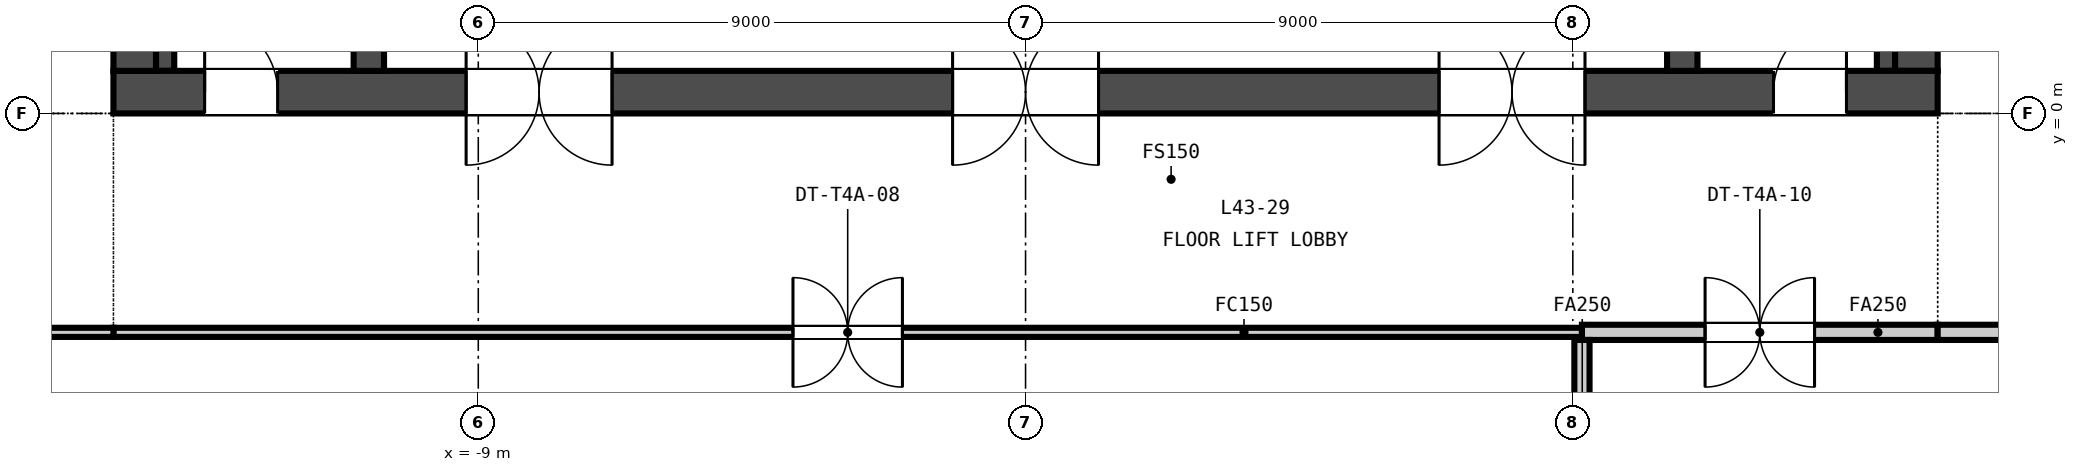
"""IFC4 building model, lengths in metres.
Left out: names, types, materials, properties, quantities, classifications, styles, units other than length and angle.
Written with IfcOpenShell. Run it as: python <this file> out.ifc"""

import sys

from ifc_helpers import new_model, si_unit, direction, frame, frame_2d, origin, place, context, subcontext, project, spatial, rectangle, extrude, element, fill, save


model = new_model("IFC4")
c1 = context("Model", 3, precision=1e-05, world=origin(), true_north=direction((0.0, 1.0)))
c2 = subcontext(c1, "Body", "Model", "MODEL_VIEW")
j1 = project(units=[si_unit("LENGTHUNIT", "METRE"), si_unit("PLANEANGLEUNIT", "RADIAN")], contexts=[c1])
p1 = place(None, origin())
s1 = spatial("IfcSite", under=j1, at=p1, CompositionType="ELEMENT")
p2 = place(p1, origin())
s2 = spatial("IfcBuilding", under=s1, at=p2, CompositionType="ELEMENT")
p3 = place(p2, frame((0.0, 0.0, 174.45)))
s3 = spatial("IfcBuildingStorey", under=s2, at=p3, CompositionType="ELEMENT", Elevation=174.45)
p4 = place(p3, frame((-15.0, 0.35, -0.15), z_axis=(0.0, 0.0, 1.0), x_axis=(1.0, 0.0, 0.0)))
e1 = element("IfcWall", 1, at=p4, inside=s3, PredefinedType="SOLIDWALL", context=c2, shape_type="SweptSolid", body=[
    extrude(rectangle(XDim=30.0, YDim=0.7, at=frame_2d((15.0, 0.0))), origin(), (0.0, 0.0, 1.0), 3.65),
])
p5 = place(p4, frame((5.8, 0.0, 0.15)))
e2 = element("IfcOpeningElement", 2, at=p5, cuts=e1, PredefinedType="OPENING", context=c2, shape_type="SweptSolid", body=[
    extrude(rectangle(XDim=2.4, YDim=2.4, at=frame_2d((1.2, 1.2))), frame((0.0, 0.36, 0.0), z_axis=(0.0, -1.0, 0.0), x_axis=(1.0, 0.0, 0.0)), (0.0, 0.0, 1.0), 0.72),
])
p6 = place(p4, frame((13.8, 0.0, 0.15)))
e3 = element("IfcOpeningElement", 3, at=p6, cuts=e1, PredefinedType="OPENING", context=c2, shape_type="SweptSolid", body=[
    extrude(rectangle(XDim=2.4, YDim=2.4, at=frame_2d((1.2, 1.2))), frame((0.0, 0.36, 0.0), z_axis=(0.0, -1.0, 0.0), x_axis=(1.0, 0.0, 0.0)), (0.0, 0.0, 1.0), 0.72),
])
p7 = place(p4, frame((21.8, 0.0, 0.15)))
e4 = element("IfcOpeningElement", 4, at=p7, cuts=e1, PredefinedType="OPENING", context=c2, shape_type="SweptSolid", body=[
    extrude(rectangle(XDim=2.4, YDim=2.4, at=frame_2d((1.2, 1.2))), frame((0.0, 0.36, 0.0), z_axis=(0.0, -1.0, 0.0), x_axis=(1.0, 0.0, 0.0)), (0.0, 0.0, 1.0), 0.72),
])
p8 = place(p4, frame((1.5, 0.0, 0.15)))
e5 = element("IfcOpeningElement", 5, at=p8, cuts=e1, PredefinedType="OPENING", context=c2, shape_type="SweptSolid", body=[
    extrude(rectangle(XDim=1.2, YDim=2.1, at=frame_2d((0.6, 1.05))), frame((0.0, 0.36, 0.0), z_axis=(0.0, -1.0, 0.0), x_axis=(1.0, 0.0, 0.0)), (0.0, 0.0, 1.0), 0.72),
])
p9 = place(p4, frame((27.3, 0.0, 0.15)))
e6 = element("IfcOpeningElement", 6, at=p9, cuts=e1, PredefinedType="OPENING", context=c2, shape_type="SweptSolid", body=[
    extrude(rectangle(XDim=1.2, YDim=2.1, at=frame_2d((0.6, 1.05))), frame((0.0, 0.36, 0.0), z_axis=(0.0, -1.0, 0.0), x_axis=(1.0, 0.0, 0.0)), (0.0, 0.0, 1.0), 0.72),
])
for number, where, z_axis, x_axis in (
    (7, (-14.65, 0.7, -0.15), (0.0, 0.0, 1.0), (0.0, 1.0, 0.0)),
    (8, (14.65, 0.7, -0.15), (0.0, 0.0, 1.0), (0.0, 1.0, 0.0)),
):
    element("IfcWall", number, at=place(p3, frame(where, z_axis=z_axis, x_axis=x_axis)), inside=s3, PredefinedType="SOLIDWALL", context=c2, shape_type="SweptSolid", body=[
        extrude(rectangle(XDim=13.6, YDim=0.7, at=frame_2d((6.8, 0.0))), origin(), (0.0, 0.0, 1.0), 3.65),
    ])
for number, where, z_axis, x_axis in (
    (9, (-10.8, 0.7, -0.15), (0.0, 0.0, 1.0), (0.0, 1.0, 0.0)),
    (10, (10.8, 0.7, -0.15), (0.0, 0.0, 1.0), (0.0, 1.0, 0.0)),
):
    element("IfcWall", number, at=place(p3, frame(where, z_axis=z_axis, x_axis=x_axis)), inside=s3, PredefinedType="SOLIDWALL", context=c2, shape_type="SweptSolid", body=[
        extrude(rectangle(XDim=13.6, YDim=0.5, at=frame_2d((6.8, 0.0))), origin(), (0.0, 0.0, 1.0), 3.65),
    ])
for number, where, z_axis, x_axis in (
    (11, (-14.15, 0.7, 0.0), (0.0, 0.0, 1.0), (0.0, 1.0, 0.0)),
    (12, (14.15, 0.7, 0.0), (0.0, 0.0, 1.0), (0.0, 1.0, 0.0)),
):
    element("IfcWall", number, at=place(p3, frame(where, z_axis=z_axis, x_axis=x_axis)), inside=s3, PredefinedType="SOLIDWALL", context=c2, shape_type="SweptSolid", body=[
        extrude(rectangle(XDim=13.6, YDim=0.3, at=frame_2d((6.8, 0.0))), origin(), (0.0, 0.0, 1.0), 3.5),
    ])
p10 = place(p3, frame((9.15, -3.6, 0.0), z_axis=(0.0, 0.0, 1.0), x_axis=(-1.0, 0.0, 0.0)))
e13 = element("IfcWall", 13, at=p10, inside=s3, PredefinedType="PARTITIONING", context=c2, shape_type="SweptSolid", body=[
    extrude(rectangle(XDim=24.15, YDim=0.15, at=frame_2d((12.075, 0.0))), origin(), (0.0, 0.0, 1.0), 2.741),
])
p11 = place(p10, frame((11.175, 0.0, 0.0)))
e14 = element("IfcOpeningElement", 14, at=p11, cuts=e13, PredefinedType="OPENING", context=c2, shape_type="SweptSolid", body=[
    extrude(rectangle(XDim=1.8, YDim=2.1, at=frame_2d((0.9, 1.05))), frame((0.0, 0.085, 0.0), z_axis=(0.0, -1.0, 0.0), x_axis=(1.0, 0.0, 0.0)), (0.0, 0.0, 1.0), 0.17),
])
p12 = place(p3, frame((15.0, -3.6, 0.0), z_axis=(0.0, 0.0, 1.0), x_axis=(-1.0, 0.0, 0.0)))
e15 = element("IfcWall", 15, at=p12, inside=s3, PredefinedType="PARTITIONING", context=c2, shape_type="SweptSolid", body=[
    extrude(rectangle(XDim=5.85, YDim=0.25, at=frame_2d((2.925, 0.0))), origin(), (0.0, 0.0, 1.0), 2.741),
])
p13 = place(p12, frame((2.025, 0.0, 0.0)))
e16 = element("IfcOpeningElement", 16, at=p13, cuts=e15, PredefinedType="OPENING", context=c2, shape_type="SweptSolid", body=[
    extrude(rectangle(XDim=1.8, YDim=2.1, at=frame_2d((0.9, 1.05))), frame((0.0, 0.135, 0.0), z_axis=(0.0, -1.0, 0.0), x_axis=(1.0, 0.0, 0.0)), (0.0, 0.0, 1.0), 0.27),
])
p14 = place(p3, frame((21.375, -3.6, 0.0), z_axis=(0.0, 0.0, 1.0), x_axis=(-1.0, 0.0, 0.0)))
e17 = element("IfcWall", 17, at=p14, inside=s3, PredefinedType="PARTITIONING", context=c2, shape_type="SweptSolid", body=[
    extrude(rectangle(XDim=6.375, YDim=0.25, at=frame_2d((3.188, 0.0))), origin(), (0.0, 0.0, 1.0), 2.741),
])
p15 = place(p14, frame((2.288, 0.0, 0.0)))
e18 = element("IfcOpeningElement", 18, at=p15, cuts=e17, PredefinedType="OPENING", context=c2, shape_type="SweptSolid", body=[
    extrude(rectangle(XDim=1.8, YDim=2.1, at=frame_2d((0.9, 1.05))), frame((0.0, 0.135, 0.0), z_axis=(0.0, -1.0, 0.0), x_axis=(1.0, 0.0, 0.0)), (0.0, 0.0, 1.0), 0.27),
])
p16 = place(p3, frame((-15.0, -3.6, 0.0), z_axis=(0.0, 0.0, 1.0), x_axis=(-1.0, 0.0, 0.0)))
e19 = element("IfcWall", 19, at=p16, inside=s3, PredefinedType="PARTITIONING", context=c2, shape_type="SweptSolid", body=[
    extrude(rectangle(XDim=3.965, YDim=0.15, at=frame_2d((1.982, 0.0))), origin(), (0.0, 0.0, 1.0), 2.741),
])
p17 = place(p3, frame((9.15, -8.85, 0.0), z_axis=(0.0, 0.0, 1.0), x_axis=(0.0, 1.0, 0.0)))
e20 = element("IfcWall", 20, at=p17, inside=s3, PredefinedType="PARTITIONING", context=c2, shape_type="SweptSolid", body=[
    extrude(rectangle(XDim=5.125, YDim=0.25, at=frame_2d((2.562, 0.0))), origin(), (0.0, 0.0, 1.0), 2.741),
])
p18 = place(p5, origin())
e21 = element("IfcDoor", 21, at=p18, inside=s3, OperationType="DOUBLE_DOOR_DOUBLE_SWING", PredefinedType="DOOR", context=c2, shape_type="SweptSolid", body=[
    extrude(rectangle(XDim=2.4, YDim=2.4, at=frame_2d((1.2, 1.2))), frame((0.0, 0.025, 0.0), z_axis=(0.0, -1.0, 0.0), x_axis=(1.0, 0.0, 0.0)), (0.0, 0.0, 1.0), 0.05),
])
fill(e2, e21)
p19 = place(p6, origin())
e22 = element("IfcDoor", 22, at=p19, inside=s3, OperationType="DOUBLE_DOOR_DOUBLE_SWING", PredefinedType="DOOR", context=c2, shape_type="SweptSolid", body=[
    extrude(rectangle(XDim=2.4, YDim=2.4, at=frame_2d((1.2, 1.2))), frame((0.0, 0.025, 0.0), z_axis=(0.0, -1.0, 0.0), x_axis=(1.0, 0.0, 0.0)), (0.0, 0.0, 1.0), 0.05),
])
fill(e3, e22)
p20 = place(p7, origin())
e23 = element("IfcDoor", 23, at=p20, inside=s3, OperationType="DOUBLE_DOOR_DOUBLE_SWING", PredefinedType="DOOR", context=c2, shape_type="SweptSolid", body=[
    extrude(rectangle(XDim=2.4, YDim=2.4, at=frame_2d((1.2, 1.2))), frame((0.0, 0.025, 0.0), z_axis=(0.0, -1.0, 0.0), x_axis=(1.0, 0.0, 0.0)), (0.0, 0.0, 1.0), 0.05),
])
fill(e4, e23)
p21 = place(p8, origin())
e24 = element("IfcDoor", 24, at=p21, inside=s3, OperationType="SINGLE_SWING_LEFT", PredefinedType="DOOR", context=c2, shape_type="SweptSolid", body=[
    extrude(rectangle(XDim=1.2, YDim=2.1, at=frame_2d((0.6, 1.05))), frame((0.0, 0.025, 0.0), z_axis=(0.0, -1.0, 0.0), x_axis=(1.0, 0.0, 0.0)), (0.0, 0.0, 1.0), 0.05),
])
fill(e5, e24)
p22 = place(p9, origin())
e25 = element("IfcDoor", 25, at=p22, inside=s3, OperationType="SINGLE_SWING_RIGHT", PredefinedType="DOOR", context=c2, shape_type="SweptSolid", body=[
    extrude(rectangle(XDim=1.2, YDim=2.1, at=frame_2d((0.6, 1.05))), frame((0.0, 0.025, 0.0), z_axis=(0.0, -1.0, 0.0), x_axis=(1.0, 0.0, 0.0)), (0.0, 0.0, 1.0), 0.05),
])
fill(e6, e25)
p23 = place(p11, origin())
e26 = element("IfcDoor", 26, at=p23, inside=s3, OperationType="DOUBLE_DOOR_DOUBLE_SWING", PredefinedType="DOOR", context=c2, shape_type="SweptSolid", body=[
    extrude(rectangle(XDim=1.8, YDim=2.1, at=frame_2d((0.9, 1.05))), frame((0.0, 0.025, 0.0), z_axis=(0.0, -1.0, 0.0), x_axis=(1.0, 0.0, 0.0)), (0.0, 0.0, 1.0), 0.05),
])
fill(e14, e26)
p24 = place(p13, origin())
e27 = element("IfcDoor", 27, at=p24, inside=s3, OperationType="DOUBLE_DOOR_DOUBLE_SWING", PredefinedType="DOOR", context=c2, shape_type="SweptSolid", body=[
    extrude(rectangle(XDim=1.8, YDim=2.1, at=frame_2d((0.9, 1.05))), frame((0.0, 0.025, 0.0), z_axis=(0.0, -1.0, 0.0), x_axis=(1.0, 0.0, 0.0)), (0.0, 0.0, 1.0), 0.05),
])
fill(e16, e27)
save(model, sys.argv[1])
